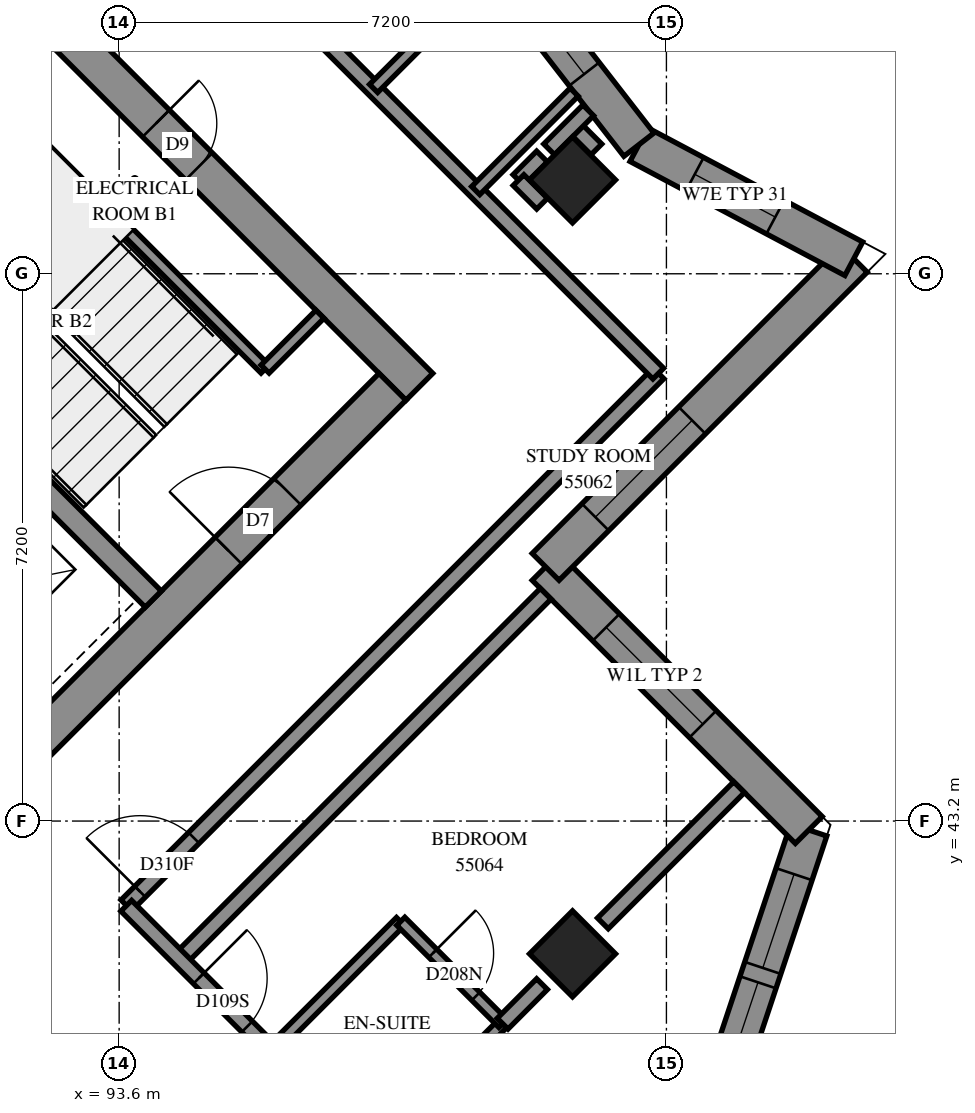
"""IFC4 building model, lengths in metres.
Left out: names, types, materials, properties, quantities, classifications, styles, units other than length and angle.
Written with IfcOpenShell. Run it as: python <this file> out.ifc"""

import sys

from ifc_helpers import new_model, si_unit, direction, frame, frame_2d, origin, origin_2d, place, context, subcontext, project, spatial, polyline, rectangle, outline, extrude, element, fill, save


model = new_model("IFC4")
c1 = context("Model", 3, precision=1e-05, world=origin(), true_north=direction((0.0, 1.0)))
c2 = subcontext(c1, "Body", "Model", "MODEL_VIEW")
j1 = project(units=[si_unit("LENGTHUNIT", "METRE"), si_unit("PLANEANGLEUNIT", "RADIAN")], contexts=[c1])
p1 = place(None, origin())
s1 = spatial("IfcSite", under=j1, at=p1, CompositionType="ELEMENT")
p2 = place(p1, origin())
s2 = spatial("IfcBuilding", under=s1, at=p2, CompositionType="ELEMENT")
p3 = place(p2, frame((0.0, 0.0, 203.2)))
s3 = spatial("IfcBuildingStorey", under=s2, at=p3, CompositionType="ELEMENT", Elevation=203.2)
for number, where, z_axis, x_axis in (
    (1, (99.565, 51.635, 0.0), (0.0, 0.0, 1.0), (0.707, -0.707, 0.0)),
    (2, (99.565, 41.453, 0.0), (0.0, 0.0, 1.0), (0.707, -0.707, 0.0)),
):
    element("IfcColumn", number, at=place(p3, frame(where, z_axis=z_axis, x_axis=x_axis)), inside=s3, PredefinedType="COLUMN", context=c2, shape_type="SweptSolid", body=[
        extrude(rectangle(XDim=0.8, YDim=0.8, at=origin_2d()), origin(), (0.0, 0.0, 1.0), 3.1),
    ])
p4 = place(p3, frame((86.66, 59.802, -0.3), z_axis=(0.0, 0.0, 1.0), x_axis=(0.7071067812, -0.7071067812, 0.0)))
e3 = element("IfcWall", 3, at=p4, inside=s3, PredefinedType="SHEAR", context=c2, shape_type="SweptSolid", body=[
    extrude(rectangle(XDim=15.4, YDim=0.5, at=frame_2d((7.7, 0.0))), origin(), (0.0, 0.0, 1.0), 2.7),
])
p5 = place(p4, frame((10.5, 0.0, 0.3)))
e4 = element("IfcOpeningElement", 4, at=p5, cuts=e3, PredefinedType="OPENING", context=c2, shape_type="SweptSolid", body=[
    extrude(rectangle(XDim=0.8, YDim=2.1, at=frame_2d((0.4, 1.05))), frame((0.0, 0.26, 0.0), z_axis=(0.0, -1.0, 0.0), x_axis=(1.0, 0.0, 0.0)), (0.0, 0.0, 1.0), 0.52),
])
p6 = place(p3, frame((87.013, 38.731, -0.3), z_axis=(0.0, 0.0, 1.0), x_axis=(0.7071067812, 0.7071067812, 0.0)))
e5 = element("IfcWall", 5, at=p6, inside=s3, PredefinedType="SHEAR", context=c2, shape_type="SweptSolid", body=[
    extrude(rectangle(XDim=14.4, YDim=0.5, at=frame_2d((7.2, 0.0))), origin(), (0.0, 0.0, 1.0), 2.7),
])
p7 = place(p6, frame((4.55, 0.0, 0.3)))
e6 = element("IfcOpeningElement", 6, at=p7, cuts=e5, PredefinedType="OPENING", context=c2, shape_type="SweptSolid", body=[
    extrude(rectangle(XDim=1.1, YDim=2.1, at=frame_2d((0.55, 1.05))), frame((0.0, 0.26, 0.0), z_axis=(0.0, -1.0, 0.0), x_axis=(1.0, 0.0, 0.0)), (0.0, 0.0, 1.0), 0.52),
])
p8 = place(p6, frame((11.35, 0.0, 0.3)))
e7 = element("IfcOpeningElement", 7, at=p8, cuts=e5, PredefinedType="OPENING", context=c2, shape_type="SweptSolid", body=[
    extrude(rectangle(XDim=1.1, YDim=2.1, at=frame_2d((0.55, 1.05))), frame((0.0, 0.26, 0.0), z_axis=(0.0, -1.0, 0.0), x_axis=(1.0, 0.0, 0.0)), (0.0, 0.0, 1.0), 0.52),
])
p9 = place(p3, frame((88.958, 51.211, 0.0), z_axis=(0.0, 0.0, 1.0), x_axis=(0.7070998367, -0.7071137256, 0.0)))
e8 = element("IfcWall", 8, at=p9, inside=s3, PredefinedType="SOLIDWALL", context=c2, shape_type="SweptSolid", body=[
    extrude(rectangle(XDim=7.2, YDim=0.3, at=frame_2d((3.6, 0.0))), origin(), (0.0, 0.0, 1.0), 3.1),
])
p10 = place(p3, frame((101.062, 38.252, 0.0), z_axis=(0.0, 0.0, 1.0), x_axis=(0.3162395484, 0.9486793705, 0.0)))
e9 = element("IfcWall", 9, at=p10, inside=s3, PredefinedType="SOLIDWALL", context=c2, shape_type="SweptSolid", body=[
    extrude(outline(polyline([(-0.12, -0.25), (5.247, -0.25), (4.938, 0.25), (0.12, 0.25), (-0.12, -0.25)])), origin(), (0.0, 0.0, 1.0), 3.1),
])
p11 = place(p10, frame((1.68, 0.0, 0.45)))
e10 = element("IfcOpeningElement", 10, at=p11, cuts=e9, PredefinedType="OPENING", context=c2, shape_type="SweptSolid", body=[
    extrude(rectangle(XDim=1.3, YDim=2.5, at=frame_2d((0.65, 1.25))), frame((0.0, 0.26, 0.0), z_axis=(0.0, -1.0, 0.0), x_axis=(1.0, 0.0, 0.0)), (0.0, 0.0, 1.0), 0.52),
])
p12 = place(p10, frame((3.18, 0.0, 0.45)))
e11 = element("IfcOpeningElement", 11, at=p12, cuts=e9, PredefinedType="OPENING", context=c2, shape_type="SweptSolid", body=[
    extrude(rectangle(XDim=1.3, YDim=2.5, at=frame_2d((0.65, 1.25))), frame((0.0, 0.26, 0.0), z_axis=(0.0, -1.0, 0.0), x_axis=(1.0, 0.0, 0.0)), (0.0, 0.0, 1.0), 0.52),
])
p13 = place(p3, frame((102.673, 43.083, 0.0), z_axis=(0.0, 0.0, 1.0), x_axis=(-0.7071067812, 0.7071067812, 0.0)))
e12 = element("IfcWall", 12, at=p13, inside=s3, PredefinedType="SOLIDWALL", context=c2, shape_type="SweptSolid", body=[
    extrude(outline(polyline([(-0.154, -0.25), (4.646, -0.25), (5.146, 0.25), (0.154, 0.25), (-0.154, -0.25)])), origin(), (0.0, 0.0, 1.0), 3.1),
])
p14 = place(p13, frame((1.97, 0.0, 0.6)))
e13 = element("IfcOpeningElement", 13, at=p14, cuts=e12, PredefinedType="OPENING", context=c2, shape_type="SweptSolid", body=[
    extrude(rectangle(XDim=1.8, YDim=1.9, at=frame_2d((0.9, 0.95))), frame((0.0, 0.26, 0.0), z_axis=(0.0, -1.0, 0.0), x_axis=(1.0, 0.0, 0.0)), (0.0, 0.0, 1.0), 0.52),
])
p15 = place(p3, frame((99.211, 46.544, 0.0), z_axis=(0.0, 0.0, 1.0), x_axis=(0.7071067812, 0.7071067812, 0.0)))
e14 = element("IfcWall", 14, at=p15, inside=s3, PredefinedType="SOLIDWALL", context=c2, shape_type="SweptSolid", body=[
    extrude(outline(polyline([(0.25, -0.25), (6.071, -0.25), (5.395, 0.25), (-0.25, 0.25), (0.25, -0.25)])), origin(), (0.0, 0.0, 1.0), 3.1),
])
p16 = place(p15, frame((0.925, 0.0, 0.6)))
e15 = element("IfcOpeningElement", 15, at=p16, cuts=e14, PredefinedType="OPENING", context=c2, shape_type="SweptSolid", body=[
    extrude(rectangle(XDim=1.8, YDim=1.9, at=frame_2d((0.9, 0.95))), frame((0.0, 0.26, 0.0), z_axis=(0.0, -1.0, 0.0), x_axis=(1.0, 0.0, 0.0)), (0.0, 0.0, 1.0), 0.52),
])
p17 = place(p3, frame((103.265, 50.598, 0.0), z_axis=(0.0, 0.0, 1.0), x_axis=(-0.883249994, 0.4689023865, 0.0)))
e16 = element("IfcWall", 16, at=p17, inside=s3, PredefinedType="SOLIDWALL", context=c2, shape_type="SweptSolid", body=[
    extrude(outline(polyline([(-0.338, -0.25), (3.147, -0.25), (3.254, 0.25), (0.338, 0.25), (-0.338, -0.25)])), origin(), (0.0, 0.0, 1.0), 3.1),
])
p18 = place(p17, frame((1.169, 0.0, 0.45)))
e17 = element("IfcOpeningElement", 17, at=p18, cuts=e16, PredefinedType="OPENING", context=c2, shape_type="SweptSolid", body=[
    extrude(rectangle(XDim=1.2, YDim=2.5, at=frame_2d((0.6, 1.25))), frame((0.0, 0.26, 0.0), z_axis=(0.0, -1.0, 0.0), x_axis=(1.0, 0.0, 0.0)), (0.0, 0.0, 1.0), 0.52),
])
p19 = place(p3, frame((100.438, 52.099, 0.0), z_axis=(0.0, 0.0, 1.0), x_axis=(-0.6128751624, 0.7901797487, 0.0)))
e18 = element("IfcWall", 18, at=p19, inside=s3, PredefinedType="SOLIDWALL", context=c2, shape_type="SweptSolid", body=[
    extrude(outline(polyline([(0.054, -0.25), (3.412, -0.25), (3.349, 0.25), (-0.054, 0.25), (0.054, -0.25)])), origin(), (0.0, 0.0, 1.0), 3.1),
])
p20 = place(p19, frame((1.175, 0.0, 0.45)))
e19 = element("IfcOpeningElement", 19, at=p20, cuts=e18, PredefinedType="OPENING", context=c2, shape_type="SweptSolid", body=[
    extrude(rectangle(XDim=1.2, YDim=2.5, at=frame_2d((0.6, 1.25))), frame((0.0, 0.26, 0.0), z_axis=(0.0, -1.0, 0.0), x_axis=(1.0, 0.0, 0.0)), (0.0, 0.0, 1.0), 0.52),
])
p21 = place(p3, frame((91.313, 53.354, 0.0), z_axis=(0.0, 0.0, 1.0), x_axis=(0.7071067812, -0.7071067812, 0.0)))
e20 = element("IfcWall", 20, at=p21, inside=s3, PredefinedType="PARTITIONING", context=c2, shape_type="SweptSolid", body=[
    extrude(rectangle(XDim=5.95, YDim=0.15, at=frame_2d((2.975, 0.0))), origin(), (0.0, 0.0, 1.0), 3.1),
])
p22 = place(p3, frame((95.52, 49.146, 0.0), z_axis=(0.0, 0.0, 1.0), x_axis=(0.7071067812, 0.7071067812, 0.0)))
e21 = element("IfcWall", 21, at=p22, inside=s3, PredefinedType="PARTITIONING", context=c2, shape_type="SweptSolid", body=[
    extrude(rectangle(XDim=1.02, YDim=0.15, at=frame_2d((0.51, 0.0))), origin(), (0.0, 0.0, 1.0), 3.1),
])
p23 = place(p3, frame((93.695, 42.091, 0.0), z_axis=(0.0, 0.0, 1.0), x_axis=(0.7071067812, 0.7071067812, 0.0)))
e22 = element("IfcWall", 22, at=p23, inside=s3, PredefinedType="PARTITIONING", context=c2, shape_type="SweptSolid", body=[
    extrude(rectangle(XDim=9.899, YDim=0.2, at=frame_2d((4.95, 0.0))), origin(), (0.0, 0.0, 1.0), 3.1),
])
p24 = place(p23, frame((0.255, 0.0, 0.0)))
e23 = element("IfcOpeningElement", 23, at=p24, cuts=e22, PredefinedType="OPENING", context=c2, shape_type="SweptSolid", body=[
    extrude(rectangle(XDim=1.0, YDim=2.1, at=frame_2d((0.5, 1.05))), frame((0.0, 0.11, 0.0), z_axis=(0.0, -1.0, 0.0), x_axis=(1.0, 0.0, 0.0)), (0.0, 0.0, 1.0), 0.22),
])
p25 = place(p3, frame((94.402, 41.382, 0.0), z_axis=(0.0, 0.0, 1.0), x_axis=(0.7072538072, 0.7069597246, 0.0)))
e24 = element("IfcWall", 24, at=p25, inside=s3, PredefinedType="PARTITIONING", context=c2, shape_type="SweptSolid", body=[
    extrude(rectangle(XDim=6.801, YDim=0.2, at=frame_2d((3.4, 0.0))), origin(), (0.0, 0.0, 1.0), 3.1),
])
p26 = place(p3, frame((96.309, 53.471, 0.0), z_axis=(0.0, 0.0, 1.0), x_axis=(0.7071067812, -0.7071067812, 0.0)))
e25 = element("IfcWall", 25, at=p26, inside=s3, PredefinedType="PARTITIONING", context=c2, shape_type="SweptSolid", body=[
    extrude(rectangle(XDim=6.2, YDim=0.2, at=frame_2d((3.1, 0.0))), origin(), (0.0, 0.0, 1.0), 3.1),
])
p27 = place(p3, frame((93.693, 42.085, 0.0), z_axis=(0.0, 0.0, 1.0), x_axis=(0.7071067812, -0.7071067812, 0.0)))
e26 = element("IfcWall", 26, at=p27, inside=s3, PredefinedType="PARTITIONING", context=c2, shape_type="SweptSolid", body=[
    extrude(rectangle(XDim=4.599, YDim=0.2, at=frame_2d((2.3, 0.0))), origin(), (0.0, 0.0, 1.0), 3.1),
])
p28 = place(p27, frame((1.349, 0.0, 0.0)))
e27 = element("IfcOpeningElement", 27, at=p28, cuts=e26, PredefinedType="OPENING", context=c2, shape_type="SweptSolid", body=[
    extrude(rectangle(XDim=0.9, YDim=2.1, at=frame_2d((0.45, 1.05))), frame((0.0, 0.11, 0.0), z_axis=(0.0, -1.0, 0.0), x_axis=(1.0, 0.0, 0.0)), (0.0, 0.0, 1.0), 0.22),
])
p29 = place(p3, frame((92.137, 40.531, 0.0), z_axis=(0.0, 0.0, 1.0), x_axis=(0.7071067812, -0.7071067812, 0.0)))
e28 = element("IfcWall", 28, at=p29, inside=s3, PredefinedType="PARTITIONING", context=c2, shape_type="SweptSolid", body=[
    extrude(rectangle(XDim=4.599, YDim=0.2, at=frame_2d((2.3, 0.0))), origin(), (0.0, 0.0, 1.0), 3.1),
])
p30 = place(p29, frame((3.083, 0.0, 0.0)))
e29 = element("IfcOpeningElement", 29, at=p30, cuts=e28, PredefinedType="OPENING", context=c2, shape_type="SweptSolid", body=[
    extrude(rectangle(XDim=0.9, YDim=2.1, at=frame_2d((0.45, 1.05))), frame((0.0, 0.11, 0.0), z_axis=(0.0, -1.0, 0.0), x_axis=(1.0, 0.0, 0.0)), (0.0, 0.0, 1.0), 0.22),
])
p31 = place(p3, frame((99.964, 41.854, 0.0), z_axis=(0.0, 0.0, 1.0), x_axis=(0.7071265121, 0.7070870497, 0.0)))
e30 = element("IfcWall", 30, at=p31, inside=s3, PredefinedType="PARTITIONING", context=c2, shape_type="SweptSolid", body=[
    extrude(rectangle(XDim=2.534, YDim=0.2, at=frame_2d((1.267, 0.0))), origin(), (0.0, 0.0, 1.0), 3.1),
])
p32 = place(p3, frame((95.603, 40.181, 0.0), z_axis=(0.0, 0.0, 1.0), x_axis=(0.7071067812, 0.7071067812, 0.0)))
e31 = element("IfcWall", 31, at=p32, inside=s3, PredefinedType="PARTITIONING", context=c2, shape_type="SweptSolid", body=[
    extrude(rectangle(XDim=2.401, YDim=0.15, at=frame_2d((1.201, 0.0))), origin(), (0.0, 0.0, 1.0), 3.1),
])
p33 = place(p3, frame((96.947, 38.837, 0.0), z_axis=(0.0, 0.0, 1.0), x_axis=(0.7071067812, 0.7071067812, 0.0)))
e32 = element("IfcWall", 32, at=p33, inside=s3, PredefinedType="PARTITIONING", context=c2, shape_type="SweptSolid", body=[
    extrude(rectangle(XDim=2.401, YDim=0.15, at=frame_2d((1.201, 0.0))), origin(), (0.0, 0.0, 1.0), 2.6),
])
p34 = place(p3, frame((96.948, 52.838, 0.0), z_axis=(0.0, 0.0, 1.0), x_axis=(0.7070826384, 0.7071309232, 0.0)))
e33 = element("IfcWall", 33, at=p34, inside=s3, PredefinedType="PARTITIONING", context=c2, shape_type="SweptSolid", body=[
    extrude(rectangle(XDim=2.071, YDim=0.15, at=frame_2d((1.036, 0.0))), origin(), (0.0, 0.0, 1.0), 3.1),
])
p35 = place(p34, frame((0.965, 0.0, 0.0)))
e34 = element("IfcOpeningElement", 34, at=p35, cuts=e33, PredefinedType="OPENING", context=c2, shape_type="SweptSolid", body=[
    extrude(rectangle(XDim=0.8, YDim=2.1, at=frame_2d((0.4, 1.05))), frame((0.0, 0.085, 0.0), z_axis=(0.0, -1.0, 0.0), x_axis=(1.0, 0.0, 0.0)), (0.0, 0.0, 1.0), 0.17),
])
p36 = place(p3, frame((97.305, 41.881, 0.0), z_axis=(0.0, 0.0, 1.0), x_axis=(0.7071067812, -0.7071067812, 0.0)))
e35 = element("IfcWall", 35, at=p36, inside=s3, PredefinedType="PARTITIONING", context=c2, shape_type="SweptSolid", body=[
    extrude(rectangle(XDim=1.901, YDim=0.15, at=frame_2d((0.95, 0.0))), origin(), (0.0, 0.0, 1.0), 3.1),
])
p37 = place(p36, frame((0.596, 0.0, 0.0)))
e36 = element("IfcOpeningElement", 36, at=p37, cuts=e35, PredefinedType="OPENING", context=c2, shape_type="SweptSolid", body=[
    extrude(rectangle(XDim=0.8, YDim=2.1, at=frame_2d((0.4, 1.05))), frame((0.0, 0.085, 0.0), z_axis=(0.0, -1.0, 0.0), x_axis=(1.0, 0.0, 0.0)), (0.0, 0.0, 1.0), 0.17),
])
p38 = place(p3, frame((98.291, 51.495, 0.0), z_axis=(0.0, 0.0, 1.0), x_axis=(0.7071067812, 0.7071067812, 0.0)))
e37 = element("IfcWall", 37, at=p38, inside=s3, PredefinedType="PARTITIONING", context=c2, shape_type="SweptSolid", body=[
    extrude(rectangle(XDim=1.831, YDim=0.15, at=frame_2d((0.915, 0.0))), origin(), (0.0, 0.0, 1.0), 3.1),
])
p39 = place(p3, frame((98.645, 40.535, 0.0), z_axis=(0.0, 0.0, 1.0), x_axis=(0.7057430303, 0.7084679069, 0.0)))
e38 = element("IfcWall", 38, at=p39, inside=s3, PredefinedType="PARTITIONING", context=c2, shape_type="SweptSolid", body=[
    extrude(rectangle(XDim=0.734, YDim=0.2, at=frame_2d((0.367, 0.0))), origin(), (0.0, 0.0, 1.0), 2.6),
])
for number, where, z_axis, x_axis in (
    (39, (98.853, 51.633, 0.0), (0.0, 0.0, 1.0), (0.707, 0.707, 0.0)),
    (40, (98.854, 51.632, 0.0), (0.0, 0.0, 1.0), (0.707, -0.707, 0.0)),
    (41, (99.568, 52.346, 0.0), (0.0, 0.0, 1.0), (0.707, -0.707, 0.0)),
):
    element("IfcWall", number, at=place(p3, frame(where, z_axis=z_axis, x_axis=x_axis)), inside=s3, PredefinedType="PARTITIONING", context=c2, shape_type="SweptSolid", body=[
        extrude(rectangle(XDim=0.438, YDim=0.2, at=frame_2d((0.219, 0.0))), origin(), (0.0, 0.0, 1.0), 3.1),
    ])
p40 = place(p3, frame((99.257, 52.037, 0.0), z_axis=(0.0, 0.0, 1.0), x_axis=(0.7071067812, 0.7071067812, 0.0)))
e42 = element("IfcWall", 42, at=p40, inside=s3, PredefinedType="PARTITIONING", context=c2, shape_type="SweptSolid", body=[
    extrude(rectangle(XDim=0.727, YDim=0.2, at=frame_2d((0.363, 0.0))), origin(), (0.0, 0.0, 1.0), 3.1),
])
p41 = place(p11, origin())
e43 = element("IfcWindow", 43, at=p41, inside=s3, PartitioningType="SINGLE_PANEL", PredefinedType="WINDOW", context=c2, shape_type="SweptSolid", body=[
    extrude(rectangle(XDim=1.3, YDim=2.5, at=frame_2d((0.65, 1.25))), frame((0.0, 0.18, 0.0), z_axis=(0.0, -1.0, 0.0), x_axis=(1.0, 0.0, 0.0)), (0.0, 0.0, 1.0), 0.06),
])
fill(e10, e43)
p42 = place(p12, origin())
e44 = element("IfcWindow", 44, at=p42, inside=s3, PartitioningType="SINGLE_PANEL", PredefinedType="WINDOW", context=c2, shape_type="SweptSolid", body=[
    extrude(rectangle(XDim=1.3, YDim=2.5, at=frame_2d((0.65, 1.25))), frame((0.0, 0.18, 0.0), z_axis=(0.0, -1.0, 0.0), x_axis=(1.0, 0.0, 0.0)), (0.0, 0.0, 1.0), 0.06),
])
fill(e11, e44)
p43 = place(p14, origin())
e45 = element("IfcWindow", 45, at=p43, inside=s3, PartitioningType="SINGLE_PANEL", PredefinedType="WINDOW", context=c2, shape_type="SweptSolid", body=[
    extrude(rectangle(XDim=1.8, YDim=1.9, at=frame_2d((0.9, 0.95))), frame((0.0, 0.18, 0.0), z_axis=(0.0, -1.0, 0.0), x_axis=(1.0, 0.0, 0.0)), (0.0, 0.0, 1.0), 0.06),
])
fill(e13, e45)
p44 = place(p16, origin())
e46 = element("IfcWindow", 46, at=p44, inside=s3, PartitioningType="SINGLE_PANEL", PredefinedType="WINDOW", context=c2, shape_type="SweptSolid", body=[
    extrude(rectangle(XDim=1.8, YDim=1.9, at=frame_2d((0.9, 0.95))), frame((0.0, 0.18, 0.0), z_axis=(0.0, -1.0, 0.0), x_axis=(1.0, 0.0, 0.0)), (0.0, 0.0, 1.0), 0.06),
])
fill(e15, e46)
p45 = place(p18, origin())
e47 = element("IfcWindow", 47, at=p45, inside=s3, PartitioningType="SINGLE_PANEL", PredefinedType="WINDOW", context=c2, shape_type="SweptSolid", body=[
    extrude(rectangle(XDim=1.2, YDim=2.5, at=frame_2d((0.6, 1.25))), frame((0.0, 0.18, 0.0), z_axis=(0.0, -1.0, 0.0), x_axis=(1.0, 0.0, 0.0)), (0.0, 0.0, 1.0), 0.06),
])
fill(e17, e47)
p46 = place(p20, origin())
e48 = element("IfcWindow", 48, at=p46, inside=s3, PartitioningType="SINGLE_PANEL", PredefinedType="WINDOW", context=c2, shape_type="SweptSolid", body=[
    extrude(rectangle(XDim=1.2, YDim=2.5, at=frame_2d((0.6, 1.25))), frame((0.0, 0.18, 0.0), z_axis=(0.0, -1.0, 0.0), x_axis=(1.0, 0.0, 0.0)), (0.0, 0.0, 1.0), 0.06),
])
fill(e19, e48)
p47 = place(p5, origin())
e49 = element("IfcDoor", 49, at=p47, inside=s3, OperationType="SINGLE_SWING_RIGHT", PredefinedType="DOOR", context=c2, shape_type="SweptSolid", body=[
    extrude(rectangle(XDim=0.8, YDim=2.1, at=frame_2d((0.4, 1.05))), frame((0.0, 0.025, 0.0), z_axis=(0.0, -1.0, 0.0), x_axis=(1.0, 0.0, 0.0)), (0.0, 0.0, 1.0), 0.05),
])
fill(e4, e49)
p48 = place(p8, origin())
e50 = element("IfcDoor", 50, at=p48, inside=s3, OperationType="SINGLE_SWING_RIGHT", PredefinedType="DOOR", context=c2, shape_type="SweptSolid", body=[
    extrude(rectangle(XDim=1.1, YDim=2.1, at=frame_2d((0.55, 1.05))), frame((0.0, 0.025, 0.0), z_axis=(0.0, -1.0, 0.0), x_axis=(1.0, 0.0, 0.0)), (0.0, 0.0, 1.0), 0.05),
])
fill(e7, e50)
p49 = place(p24, origin())
e51 = element("IfcDoor", 51, at=p49, inside=s3, OperationType="SINGLE_SWING_LEFT", PredefinedType="DOOR", context=c2, shape_type="SweptSolid", body=[
    extrude(rectangle(XDim=1.0, YDim=2.1, at=frame_2d((0.5, 1.05))), frame((0.0, 0.025, 0.0), z_axis=(0.0, -1.0, 0.0), x_axis=(1.0, 0.0, 0.0)), (0.0, 0.0, 1.0), 0.05),
])
fill(e23, e51)
p50 = place(p28, origin())
e52 = element("IfcDoor", 52, at=p50, inside=s3, OperationType="SINGLE_SWING_RIGHT", PredefinedType="DOOR", context=c2, shape_type="SweptSolid", body=[
    extrude(rectangle(XDim=0.9, YDim=2.1, at=frame_2d((0.45, 1.05))), frame((0.0, 0.025, 0.0), z_axis=(0.0, -1.0, 0.0), x_axis=(1.0, 0.0, 0.0)), (0.0, 0.0, 1.0), 0.05),
])
fill(e27, e52)
p51 = place(p37, origin())
e53 = element("IfcDoor", 53, at=p51, inside=s3, OperationType="SINGLE_SWING_RIGHT", PredefinedType="DOOR", context=c2, shape_type="SweptSolid", body=[
    extrude(rectangle(XDim=0.8, YDim=2.1, at=frame_2d((0.4, 1.05))), frame((0.0, 0.025, 0.0), z_axis=(0.0, -1.0, 0.0), x_axis=(1.0, 0.0, 0.0)), (0.0, 0.0, 1.0), 0.05),
])
fill(e36, e53)
save(model, sys.argv[1])
